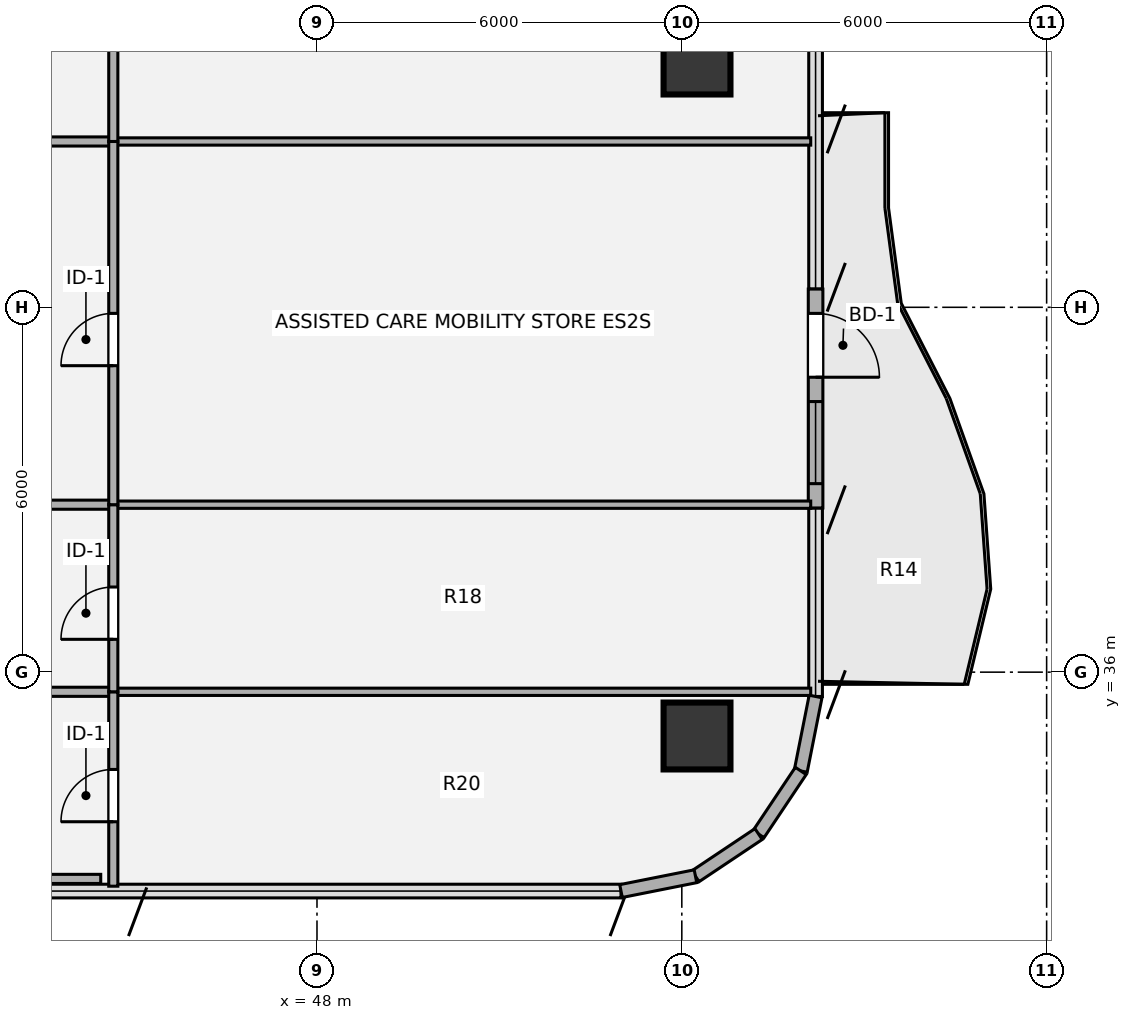
"""IFC4 building model, lengths in metres.
Left out: names, types, materials, properties, quantities, classifications, styles, units other than length and angle.
Written with IfcOpenShell. Run it as: python <this file> out.ifc"""

import sys

from ifc_helpers import new_model, si_unit, direction, frame, frame_2d, origin, origin_2d, place, context, subcontext, project, spatial, rectangle, hollow_circle, extrude, source, transform, mapped, element, fill, save


model = new_model("IFC4")
c1 = context("Model", 3, precision=1e-05, world=origin(), true_north=direction((0.0, 1.0)))
c2 = subcontext(c1, "Body", "Model", "MODEL_VIEW")
j1 = project(units=[si_unit("LENGTHUNIT", "METRE"), si_unit("PLANEANGLEUNIT", "RADIAN")], contexts=[c1])
p1 = place(None, origin())
s1 = spatial("IfcSite", under=j1, at=p1, CompositionType="ELEMENT")
p2 = place(p1, origin())
s2 = spatial("IfcBuilding", under=s1, at=p2, CompositionType="ELEMENT")
p3 = place(p2, frame((0.0, 0.0, 171.54)))
s3 = spatial("IfcBuildingStorey", under=s2, at=p3, CompositionType="ELEMENT", Elevation=171.54)
m1 = source(origin(), c2, "Body", "SweptSolid", [
    extrude(hollow_circle(Radius=0.55, WallThickness=0.04, at=origin_2d()), origin(), (0.0, 0.0, 1.0), 3.78),
])
for number, where, z_axis, x_axis in (
    (1, (54.25, 34.95, 0.0), (0.0, 0.0, 1.0), (1.0, 0.0, 0.0)),
    (2, (54.25, 46.05, 0.0), (0.0, 0.0, 1.0), (1.0, 0.0, 0.0)),
):
    element("IfcColumn", number, at=place(p3, frame(where, z_axis=z_axis, x_axis=x_axis)), inside=s3, PredefinedType="COLUMN", context=c2, shape_type="MappedRepresentation", body=[
        mapped(m1, transform((0.0, 0.0, 0.0), x_axis=(1.0, 0.0, 0.0), y_axis=(0.0, 1.0, 0.0), z_axis=(0.0, 0.0, 1.0), scale=1.0)),
    ])
p4 = place(p3, frame((56.2, 42.3, 0.0), z_axis=(0.0, 0.0, 1.0), x_axis=(0.0, -1.0, 0.0)))
e3 = element("IfcWall", 3, at=p4, inside=s3, PredefinedType="SOLIDWALL", context=c2, shape_type="SweptSolid", body=[
    extrude(rectangle(XDim=3.6, YDim=0.24, at=frame_2d((1.8, 0.0))), origin(), (0.0, 0.0, 1.0), 3.53),
])
p5 = place(p4, frame((0.4, 0.0, 0.0)))
e4 = element("IfcOpeningElement", 4, at=p5, cuts=e3, PredefinedType="OPENING", context=c2, shape_type="SweptSolid", body=[
    extrude(rectangle(XDim=1.05, YDim=2.15, at=origin_2d()), frame((0.525, 0.13, 1.075), z_axis=(0.0, -1.0, 0.0), x_axis=(1.0, 0.0, 0.0)), (0.0, 0.0, 1.0), 0.26),
])
p6 = place(p4, frame((1.85, 0.0, 0.85)))
e5 = element("IfcOpeningElement", 5, at=p6, cuts=e3, PredefinedType="OPENING", context=c2, shape_type="SweptSolid", body=[
    extrude(rectangle(XDim=1.35, YDim=1.35, at=origin_2d()), frame((0.675, 0.13, 0.675), z_axis=(0.0, -1.0, 0.0), x_axis=(1.0, 0.0, 0.0)), (0.0, 0.0, 1.0), 0.26),
])
for number, where, z_axis, x_axis in (
    (6, (56.2, 35.6, 0.0), (0.0, 0.0, 1.0), (-0.195, -0.981, 0.0)),
    (7, (55.956, 34.375, 0.0), (0.0, 0.0, 1.0), (-0.556, -0.831, 0.0)),
    (8, (55.263, 33.337, 0.0), (0.0, 0.0, 1.0), (-0.831, -0.556, 0.0)),
    (9, (54.225, 32.644, 0.0), (0.0, 0.0, 1.0), (-0.981, -0.195, 0.0)),
):
    element("IfcWall", number, at=place(p3, frame(where, z_axis=z_axis, x_axis=x_axis)), inside=s3, PredefinedType="SOLIDWALL", context=c2, shape_type="SweptSolid", body=[
        extrude(rectangle(XDim=1.249, YDim=0.215, at=frame_2d((0.624, 0.0))), origin(), (0.0, 0.0, 1.0), 3.53),
    ])
p7 = place(p3, frame((38.45, 32.6, 0.0), z_axis=(0.0, 0.0, 1.0), x_axis=(1.0, 0.0, 0.0)))
e10 = element("IfcWall", 10, at=p7, inside=s3, PredefinedType="PARTITIONING", context=c2, shape_type="SweptSolid", body=[
    extrude(rectangle(XDim=5.993, YDim=0.15, at=frame_2d((2.997, 0.0))), origin(), (0.0, 0.0, 1.0), 3.5),
])
p8 = place(p3, frame((38.45, 35.677, 0.0), z_axis=(0.0, 0.0, 1.0), x_axis=(1.0, 0.0, 0.0)))
e11 = element("IfcWall", 11, at=p8, inside=s3, PredefinedType="PARTITIONING", context=c2, shape_type="SweptSolid", body=[
    extrude(rectangle(XDim=6.2, YDim=0.15, at=frame_2d((3.1, 0.0))), origin(), (0.0, 0.0, 1.0), 2.982),
])
p9 = place(p3, frame((44.65, 35.677, 0.0), z_axis=(0.0, 0.0, 1.0), x_axis=(1.0, 0.0, 0.0)))
e12 = element("IfcWall", 12, at=p9, inside=s3, PredefinedType="PARTITIONING", context=c2, shape_type="SweptSolid", body=[
    extrude(rectangle(XDim=11.47, YDim=0.12, at=frame_2d((5.735, 0.0))), origin(), (0.0, 0.0, 1.0), 2.982),
])
p10 = place(p3, frame((38.45, 38.754, 0.0), z_axis=(0.0, 0.0, 1.0), x_axis=(1.0, 0.0, 0.0)))
e13 = element("IfcWall", 13, at=p10, inside=s3, PredefinedType="PARTITIONING", context=c2, shape_type="SweptSolid", body=[
    extrude(rectangle(XDim=6.2, YDim=0.15, at=frame_2d((3.1, 0.0))), origin(), (0.0, 0.0, 1.0), 2.982),
])
p11 = place(p3, frame((44.65, 38.754, 0.0), z_axis=(0.0, 0.0, 1.0), x_axis=(1.0, 0.0, 0.0)))
e14 = element("IfcWall", 14, at=p11, inside=s3, PredefinedType="PARTITIONING", context=c2, shape_type="SweptSolid", body=[
    extrude(rectangle(XDim=11.47, YDim=0.12, at=frame_2d((5.735, 0.0))), origin(), (0.0, 0.0, 1.0), 2.982),
])
p12 = place(p3, frame((38.45, 44.727, 0.0), z_axis=(0.0, 0.0, 1.0), x_axis=(1.0, 0.0, 0.0)))
e15 = element("IfcWall", 15, at=p12, inside=s3, PredefinedType="PARTITIONING", context=c2, shape_type="SweptSolid", body=[
    extrude(rectangle(XDim=6.2, YDim=0.15, at=frame_2d((3.1, 0.0))), origin(), (0.0, 0.0, 1.0), 3.055),
])
p13 = place(p3, frame((44.65, 44.727, 0.0), z_axis=(0.0, 0.0, 1.0), x_axis=(1.0, 0.0, 0.0)))
e16 = element("IfcWall", 16, at=p13, inside=s3, PredefinedType="PARTITIONING", context=c2, shape_type="SweptSolid", body=[
    extrude(rectangle(XDim=11.47, YDim=0.12, at=frame_2d((5.735, 0.0))), origin(), (0.0, 0.0, 1.0), 3.055),
])
p14 = place(p3, frame((44.65, 32.48, 0.0), z_axis=(0.0, 0.0, 1.0), x_axis=(0.0, 1.0, 0.0)))
e17 = element("IfcWall", 17, at=p14, inside=s3, PredefinedType="PARTITIONING", context=c2, shape_type="SweptSolid", body=[
    extrude(rectangle(XDim=3.197, YDim=0.15, at=frame_2d((1.599, 0.0))), origin(), (0.0, 0.0, 1.0), 3.5),
])
p15 = place(p14, frame((1.06, 0.0, 0.0)))
e18 = element("IfcOpeningElement", 18, at=p15, cuts=e17, PredefinedType="OPENING", context=c2, shape_type="SweptSolid", body=[
    extrude(rectangle(XDim=0.86, YDim=2.1, at=origin_2d()), frame((0.43, 0.085, 1.05), z_axis=(0.0, -1.0, 0.0), x_axis=(1.0, 0.0, 0.0)), (0.0, 0.0, 1.0), 0.17),
])
p16 = place(p3, frame((44.65, 35.677, 0.0), z_axis=(0.0, 0.0, 1.0), x_axis=(0.0, 1.0, 0.0)))
e19 = element("IfcWall", 19, at=p16, inside=s3, PredefinedType="PARTITIONING", context=c2, shape_type="SweptSolid", body=[
    extrude(rectangle(XDim=3.077, YDim=0.15, at=frame_2d((1.539, 0.0))), origin(), (0.0, 0.0, 1.0), 3.5),
])
p17 = place(p16, frame((0.863, 0.0, 0.0)))
e20 = element("IfcOpeningElement", 20, at=p17, cuts=e19, PredefinedType="OPENING", context=c2, shape_type="SweptSolid", body=[
    extrude(rectangle(XDim=0.86, YDim=2.1, at=origin_2d()), frame((0.43, 0.085, 1.05), z_axis=(0.0, -1.0, 0.0), x_axis=(1.0, 0.0, 0.0)), (0.0, 0.0, 1.0), 0.17),
])
p18 = place(p3, frame((44.65, 38.754, 0.0), z_axis=(0.0, 0.0, 1.0), x_axis=(0.0, 1.0, 0.0)))
e21 = element("IfcWall", 21, at=p18, inside=s3, PredefinedType="PARTITIONING", context=c2, shape_type="SweptSolid", body=[
    extrude(rectangle(XDim=5.973, YDim=0.15, at=frame_2d((2.987, 0.0))), origin(), (0.0, 0.0, 1.0), 3.5),
])
p19 = place(p18, frame((2.286, 0.0, 0.0)))
e22 = element("IfcOpeningElement", 22, at=p19, cuts=e21, PredefinedType="OPENING", context=c2, shape_type="SweptSolid", body=[
    extrude(rectangle(XDim=0.86, YDim=2.1, at=origin_2d()), frame((0.43, 0.085, 1.05), z_axis=(0.0, -1.0, 0.0), x_axis=(1.0, 0.0, 0.0)), (0.0, 0.0, 1.0), 0.17),
])
p20 = place(p3, frame((44.65, 44.727, 0.0), z_axis=(0.0, 0.0, 1.0), x_axis=(0.0, 1.0, 0.0)))
e23 = element("IfcWall", 23, at=p20, inside=s3, PredefinedType="PARTITIONING", context=c2, shape_type="SweptSolid", body=[
    extrude(rectangle(XDim=5.973, YDim=0.15, at=frame_2d((2.986, 0.0))), origin(), (0.0, 0.0, 1.0), 3.5),
])
p21 = place(p20, frame((2.313, 0.0, 0.0)))
e24 = element("IfcOpeningElement", 24, at=p21, cuts=e23, PredefinedType="OPENING", context=c2, shape_type="SweptSolid", body=[
    extrude(rectangle(XDim=0.86, YDim=2.1, at=origin_2d()), frame((0.43, 0.085, 1.05), z_axis=(0.0, -1.0, 0.0), x_axis=(1.0, 0.0, 0.0)), (0.0, 0.0, 1.0), 0.17),
])
m2 = source(origin(), c2, "Body", "SweptSolid", [
    extrude(rectangle(XDim=1.05, YDim=2.15, at=origin_2d()), frame((0.525, 0.025, 1.075), z_axis=(0.0, -1.0, 0.0), x_axis=(1.0, 0.0, 0.0)), (0.0, 0.0, 1.0), 0.05),
])
p22 = place(p5, origin())
e25 = element("IfcDoor", 25, at=p22, inside=s3, OperationType="SINGLE_SWING_RIGHT", PredefinedType="DOOR", context=c2, shape_type="MappedRepresentation", body=[
    mapped(m2, transform((0.0, 0.0, 0.0), x_axis=(1.0, 0.0, 0.0), y_axis=(0.0, 1.0, 0.0), z_axis=(0.0, 0.0, 1.0), scale=1.0)),
])
fill(e4, e25)
m3 = source(origin(), c2, "Body", "SweptSolid", [
    extrude(rectangle(XDim=1.35, YDim=1.35, at=origin_2d()), frame((0.675, 0.03, 0.675), z_axis=(0.0, -1.0, 0.0), x_axis=(1.0, 0.0, 0.0)), (0.0, 0.0, 1.0), 0.06),
])
p23 = place(p6, origin())
e26 = element("IfcWindow", 26, at=p23, inside=s3, PartitioningType="SINGLE_PANEL", PredefinedType="WINDOW", context=c2, shape_type="MappedRepresentation", body=[
    mapped(m3, transform((0.0, 0.0, 0.0), x_axis=(1.0, 0.0, 0.0), y_axis=(0.0, 1.0, 0.0), z_axis=(0.0, 0.0, 1.0), scale=1.0)),
])
fill(e5, e26)
m4 = source(origin(), c2, "Body", "SweptSolid", [
    extrude(rectangle(XDim=0.86, YDim=2.1, at=origin_2d()), frame((0.43, 0.025, 1.05), z_axis=(0.0, -1.0, 0.0), x_axis=(1.0, 0.0, 0.0)), (0.0, 0.0, 1.0), 0.05),
])
p24 = place(p15, origin())
e27 = element("IfcDoor", 27, at=p24, inside=s3, OperationType="SINGLE_SWING_LEFT", PredefinedType="DOOR", context=c2, shape_type="MappedRepresentation", body=[
    mapped(m4, transform((0.0, 0.0, 0.0), x_axis=(1.0, 0.0, 0.0), y_axis=(0.0, 1.0, 0.0), z_axis=(0.0, 0.0, 1.0), scale=1.0)),
])
fill(e18, e27)
p25 = place(p17, origin())
e28 = element("IfcDoor", 28, at=p25, inside=s3, OperationType="SINGLE_SWING_LEFT", PredefinedType="DOOR", context=c2, shape_type="MappedRepresentation", body=[
    mapped(m4, transform((0.0, 0.0, 0.0), x_axis=(1.0, 0.0, 0.0), y_axis=(0.0, 1.0, 0.0), z_axis=(0.0, 0.0, 1.0), scale=1.0)),
])
fill(e20, e28)
p26 = place(p19, origin())
e29 = element("IfcDoor", 29, at=p26, inside=s3, OperationType="SINGLE_SWING_LEFT", PredefinedType="DOOR", context=c2, shape_type="MappedRepresentation", body=[
    mapped(m4, transform((0.0, 0.0, 0.0), x_axis=(1.0, 0.0, 0.0), y_axis=(0.0, 1.0, 0.0), z_axis=(0.0, 0.0, 1.0), scale=1.0)),
])
fill(e22, e29)
save(model, sys.argv[1])
